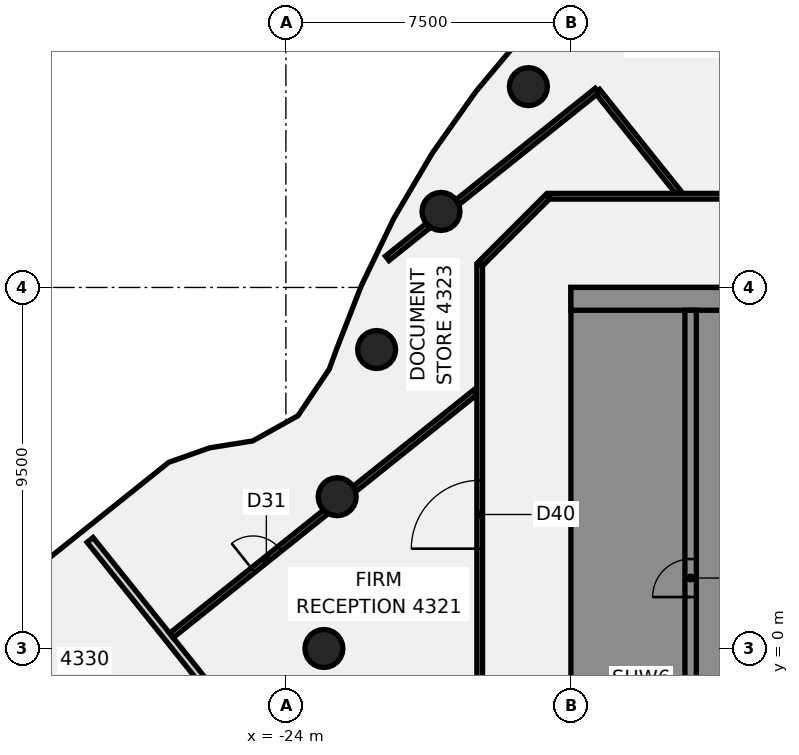
"""IFC4 building model, lengths in metres.
Left out: names, types, materials, properties, quantities, classifications, styles, units other than length and angle.
Written with IfcOpenShell. Run it as: python <this file> out.ifc"""

import sys

from ifc_helpers import new_model, si_unit, direction, frame, frame_2d, origin, origin_2d, place, context, subcontext, project, spatial, polyline, rectangle, circle, outline, extrude, element, fill, save


model = new_model("IFC4")
c1 = context("Model", 3, precision=1e-05, world=origin(), true_north=direction((0.0, 1.0)))
c2 = subcontext(c1, "Body", "Model", "MODEL_VIEW")
j1 = project(units=[si_unit("LENGTHUNIT", "METRE"), si_unit("PLANEANGLEUNIT", "RADIAN")], contexts=[c1])
p1 = place(None, origin())
s1 = spatial("IfcSite", under=j1, at=p1, CompositionType="ELEMENT")
p2 = place(p1, origin())
s2 = spatial("IfcBuilding", under=s1, at=p2, CompositionType="ELEMENT")
p3 = place(p2, frame((0.0, 0.0, 174.25)))
s3 = spatial("IfcBuildingStorey", under=s2, at=p3, CompositionType="ELEMENT", Elevation=174.25)
for number, where, z_axis, x_axis in (
    (1, (-17.619, 14.784, -0.14), (0.0, 0.0, 1.0), (1.0, 0.0, 0.0)),
    (2, (-19.919, 11.5, -0.14), (0.0, 0.0, 1.0), (1.0, 0.0, 0.0)),
    (3, (-21.613, 7.866, -0.14), (0.0, 0.0, 1.0), (1.0, 0.0, 0.0)),
    (4, (-22.651, 3.994, -0.14), (0.0, 0.0, 1.0), (1.0, 0.0, 0.0)),
    (5, (-23.0, 0.0, -0.14), (0.0, 0.0, 1.0), (1.0, 0.0, 0.0)),
):
    element("IfcColumn", number, at=place(p3, frame(where, z_axis=z_axis, x_axis=x_axis)), inside=s3, PredefinedType="COLUMN", context=c2, shape_type="SweptSolid", body=[
        extrude(circle(Radius=0.5, at=origin_2d()), origin(), (0.0, 0.0, 1.0), 3.71),
    ])
p4 = place(p3, frame((-29.152, 2.857, 0.0), z_axis=(0.0, 0.0, 1.0), x_axis=(0.624692956649, -0.780870482163, 0.0)))
e6 = element("IfcWall", 6, at=p4, inside=s3, PredefinedType="PARTITIONING", context=c2, shape_type="SweptSolid", body=[
    extrude(rectangle(XDim=14.24, YDim=0.2, at=frame_2d((7.12, 0.0))), origin(), (0.0, 0.0, 1.0), 2.87),
])
p5 = place(p4, frame((6.099, 0.0, 0.0)))
e7 = element("IfcOpeningElement", 7, at=p5, cuts=e6, PredefinedType="OPENING", context=c2, shape_type="SweptSolid", body=[
    extrude(rectangle(XDim=1.4, YDim=2.1, at=frame_2d((0.7, 1.05))), frame((0.0, 0.11, 0.0), z_axis=(0.0, -1.0, 0.0), x_axis=(1.0, 0.0, 0.0)), (0.0, 0.0, 1.0), 0.22),
])
p6 = place(p3, frame((-15.802, 14.664, 0.0), z_axis=(0.0, 0.0, 1.0), x_axis=(0.624703791161, -0.780861814477, 0.0)))
e8 = element("IfcWall", 8, at=p6, inside=s3, PredefinedType="PARTITIONING", context=c2, shape_type="SweptSolid", body=[
    extrude(rectangle(XDim=3.405, YDim=0.15, at=frame_2d((1.703, 0.0))), origin(), (0.0, 0.0, 1.0), 2.97),
])
p7 = place(p3, frame((-17.065, 11.9, 0.0), z_axis=(0.0, 0.0, 1.0), x_axis=(1.0, 0.0, 0.0)))
e9 = element("IfcWall", 9, at=p7, inside=s3, PredefinedType="PARTITIONING", context=c2, shape_type="SweptSolid", body=[
    extrude(rectangle(XDim=34.165, YDim=0.15, at=frame_2d((17.083, 0.0))), origin(), (0.0, 0.0, 1.0), 2.97),
])
p8 = place(p7, frame((22.89, 0.0, 0.0)))
e10 = element("IfcOpeningElement", 10, at=p8, cuts=e9, PredefinedType="OPENING", context=c2, shape_type="SweptSolid", body=[
    extrude(rectangle(XDim=1.8, YDim=2.1, at=frame_2d((0.9, 1.05))), frame((0.0, 0.085, 0.0), z_axis=(0.0, -1.0, 0.0), x_axis=(1.0, 0.0, 0.0)), (0.0, 0.0, 1.0), 0.17),
])
p9 = place(p7, frame((28.801, 0.0, 0.0)))
e11 = element("IfcOpeningElement", 11, at=p9, cuts=e9, PredefinedType="OPENING", context=c2, shape_type="SweptSolid", body=[
    extrude(rectangle(XDim=1.8, YDim=2.1, at=frame_2d((0.9, 1.05))), frame((0.0, 0.085, 0.0), z_axis=(0.0, -1.0, 0.0), x_axis=(1.0, 0.0, 0.0)), (0.0, 0.0, 1.0), 0.17),
])
p10 = place(p7, frame((8.574, 0.0, 0.0)))
e12 = element("IfcOpeningElement", 12, at=p10, cuts=e9, PredefinedType="OPENING", context=c2, shape_type="SweptSolid", body=[
    extrude(rectangle(XDim=1.8, YDim=2.1, at=frame_2d((0.9, 1.05))), frame((0.0, 0.085, 0.0), z_axis=(0.0, -1.0, 0.0), x_axis=(1.0, 0.0, 0.0)), (0.0, 0.0, 1.0), 0.17),
])
p11 = place(p3, frame((-27.013, 0.344, 0.0), z_axis=(0.0, 0.0, 1.0), x_axis=(0.780855081302, 0.624712207344, 0.0)))
e13 = element("IfcWall", 13, at=p11, inside=s3, PredefinedType="PARTITIONING", context=c2, shape_type="SweptSolid", body=[
    extrude(rectangle(XDim=5.205, YDim=0.15, at=frame_2d((2.603, 0.0))), origin(), (0.0, 0.0, 1.0), 2.97),
])
p12 = place(p11, frame((2.75, 0.0, 0.0)))
e14 = element("IfcOpeningElement", 14, at=p12, cuts=e13, PredefinedType="OPENING", context=c2, shape_type="SweptSolid", body=[
    extrude(rectangle(XDim=0.9, YDim=2.1, at=frame_2d((0.45, 1.05))), frame((0.0, 0.085, 0.0), z_axis=(0.0, -1.0, 0.0), x_axis=(1.0, 0.0, 0.0)), (0.0, 0.0, 1.0), 0.17),
])
p13 = place(p3, frame((-22.195, 4.198, 0.0), z_axis=(0.0, 0.0, 1.0), x_axis=(0.780862978875, 0.624702335694, 0.0)))
e15 = element("IfcWall", 15, at=p13, inside=s3, PredefinedType="PARTITIONING", context=c2, shape_type="SweptSolid", body=[
    extrude(rectangle(XDim=4.085, YDim=0.15, at=frame_2d((2.042, 0.0))), origin(), (0.0, 0.0, 1.0), 2.97),
])
p14 = place(p3, frame((-21.333, 10.266, 0.0), z_axis=(0.0, 0.0, 1.0), x_axis=(0.780920261551, 0.62463072699, 0.0)))
e16 = element("IfcWall", 16, at=p14, inside=s3, PredefinedType="PARTITIONING", context=c2, shape_type="SweptSolid", body=[
    extrude(rectangle(XDim=1.389, YDim=0.15, at=frame_2d((0.694, 0.0))), origin(), (0.0, 0.0, 1.0), 2.97),
])
p15 = place(p3, frame((-19.476, 11.752, 0.0), z_axis=(0.0, 0.0, 1.0), x_axis=(0.780939933327, 0.624606132323, 0.0)))
e17 = element("IfcWall", 17, at=p15, inside=s3, PredefinedType="PARTITIONING", context=c2, shape_type="SweptSolid", body=[
    extrude(rectangle(XDim=4.688, YDim=0.15, at=frame_2d((2.344, 0.0))), origin(), (0.0, 0.0, 1.0), 2.97),
])
p16 = place(p3, frame((-18.872, 10.128, 0.0), z_axis=(0.0, 0.0, 1.0), x_axis=(0.707106781187, 0.707106781187, 0.0)))
e18 = element("IfcWall", 18, at=p16, inside=s3, PredefinedType="PARTITIONING", context=c2, shape_type="SweptSolid", body=[
    extrude(rectangle(XDim=2.505, YDim=0.15, at=frame_2d((1.253, 0.0))), origin(), (0.0, 0.0, 1.0), 2.97),
])
p17 = place(p3, frame((-18.9, -10.1, 0.0), z_axis=(0.0, 0.0, 1.0), x_axis=(0.0, 1.0, 0.0)))
e19 = element("IfcWall", 19, at=p17, inside=s3, PredefinedType="PARTITIONING", context=c2, shape_type="SweptSolid", body=[
    extrude(rectangle(XDim=20.2, YDim=0.15, at=frame_2d((10.1, 0.0))), origin(), (0.0, 0.0, 1.0), 2.97),
])
p18 = place(p17, frame((12.726, 0.0, 0.0)))
e20 = element("IfcOpeningElement", 20, at=p18, cuts=e19, PredefinedType="OPENING", context=c2, shape_type="SweptSolid", body=[
    extrude(rectangle(XDim=1.8, YDim=2.1, at=frame_2d((0.9, 1.05))), frame((0.0, 0.085, 0.0), z_axis=(0.0, -1.0, 0.0), x_axis=(1.0, 0.0, 0.0)), (0.0, 0.0, 1.0), 0.17),
])
p19 = place(p17, frame((4.047, 0.0, 0.0)))
e21 = element("IfcOpeningElement", 21, at=p19, cuts=e19, PredefinedType="OPENING", context=c2, shape_type="SweptSolid", body=[
    extrude(rectangle(XDim=1.8, YDim=2.1, at=frame_2d((0.9, 1.05))), frame((0.0, 0.085, 0.0), z_axis=(0.0, -1.0, 0.0), x_axis=(1.0, 0.0, 0.0)), (0.0, 0.0, 1.0), 0.17),
])
p20 = place(p3, origin())
e22 = element("IfcWall", 22, at=p20, inside=s3, PredefinedType="SHEAR", context=c2, shape_type="SweptSolid", body=[
    extrude(outline(polyline([(-13.5, -8.125), (-15.9, -8.125), (-15.9, -5.625), (-13.5, -5.625), (-13.5, -5.375), (-15.9, -5.375), (-15.9, 5.375), (-13.5, 5.375), (-13.5, 5.625), (-15.9, 5.625), (-15.9, 8.125), (-13.5, 8.125), (-13.5, 8.9), (-15.9, 8.9), (-16.5, 8.9), (-16.5, -8.9), (-15.9, -8.9), (-13.5, -8.9), (-13.5, -8.125)])), origin(), (0.0, 0.0, 1.0), 3.57),
])
p21 = place(p3, frame((-16.5, 9.2, 0.0), z_axis=(0.0, 0.0, 1.0), x_axis=(1.0, 0.0, 0.0)))
e23 = element("IfcWall", 23, at=p21, inside=s3, PredefinedType="SHEAR", context=c2, shape_type="SweptSolid", body=[
    extrude(rectangle(XDim=13.0, YDim=0.6, at=frame_2d((6.5, 0.0))), origin(), (0.0, 0.0, 1.0), 3.57),
])
p22 = place(p3, frame((-13.35, -8.9, 0.0), z_axis=(0.0, 0.0, 1.0), x_axis=(0.0, 1.0, 0.0)))
e24 = element("IfcWall", 24, at=p22, inside=s3, PredefinedType="SHEAR", context=c2, shape_type="SweptSolid", body=[
    extrude(rectangle(XDim=17.8, YDim=0.3, at=frame_2d((8.9, 0.0))), origin(), (0.0, 0.0, 1.0), 3.57),
])
p23 = place(p22, frame((1.325, 0.0, 0.0)))
e25 = element("IfcOpeningElement", 25, at=p23, cuts=e24, PredefinedType="OPENING", context=c2, shape_type="SweptSolid", body=[
    extrude(rectangle(XDim=1.4, YDim=2.1, at=frame_2d((0.7, 1.05))), frame((0.0, 0.16, 0.0), z_axis=(0.0, -1.0, 0.0), x_axis=(1.0, 0.0, 0.0)), (0.0, 0.0, 1.0), 0.32),
])
p24 = place(p22, frame((4.754, 0.0, 0.0)))
e26 = element("IfcOpeningElement", 26, at=p24, cuts=e24, PredefinedType="OPENING", context=c2, shape_type="SweptSolid", body=[
    extrude(rectangle(XDim=1.0, YDim=2.1, at=frame_2d((0.5, 1.05))), frame((0.0, 0.16, 0.0), z_axis=(0.0, -1.0, 0.0), x_axis=(1.0, 0.0, 0.0)), (0.0, 0.0, 1.0), 0.32),
])
p25 = place(p22, frame((10.254, 0.0, 0.0)))
e27 = element("IfcOpeningElement", 27, at=p25, cuts=e24, PredefinedType="OPENING", context=c2, shape_type="SweptSolid", body=[
    extrude(rectangle(XDim=1.0, YDim=2.1, at=frame_2d((0.5, 1.05))), frame((0.0, 0.16, 0.0), z_axis=(0.0, -1.0, 0.0), x_axis=(1.0, 0.0, 0.0)), (0.0, 0.0, 1.0), 0.32),
])
p26 = place(p12, origin())
e28 = element("IfcDoor", 28, at=p26, inside=s3, OperationType="SINGLE_SWING_LEFT", PredefinedType="DOOR", context=c2, shape_type="SweptSolid", body=[
    extrude(rectangle(XDim=0.9, YDim=2.1, at=frame_2d((0.45, 1.05))), frame((0.0, 0.025, 0.0), z_axis=(0.0, -1.0, 0.0), x_axis=(1.0, 0.0, 0.0)), (0.0, 0.0, 1.0), 0.05),
])
fill(e14, e28)
p27 = place(p18, frame((1.8, 0.0, 0.0), z_axis=(0.0, 0.0, 1.0), x_axis=(-1.0, 0.0, 0.0)))
e29 = element("IfcDoor", 29, at=p27, inside=s3, OperationType="DOUBLE_DOOR_SINGLE_SWING", PredefinedType="DOOR", context=c2, shape_type="SweptSolid", body=[
    extrude(rectangle(XDim=1.8, YDim=2.1, at=frame_2d((0.9, 1.05))), frame((0.0, 0.025, 0.0), z_axis=(0.0, -1.0, 0.0), x_axis=(1.0, 0.0, 0.0)), (0.0, 0.0, 1.0), 0.05),
])
fill(e20, e29)
p28 = place(p25, origin())
e30 = element("IfcDoor", 30, at=p28, inside=s3, OperationType="SINGLE_SWING_LEFT", PredefinedType="DOOR", context=c2, shape_type="SweptSolid", body=[
    extrude(rectangle(XDim=1.0, YDim=2.1, at=frame_2d((0.5, 1.05))), frame((0.0, 0.025, 0.0), z_axis=(0.0, -1.0, 0.0), x_axis=(1.0, 0.0, 0.0)), (0.0, 0.0, 1.0), 0.05),
])
fill(e27, e30)
save(model, sys.argv[1])
